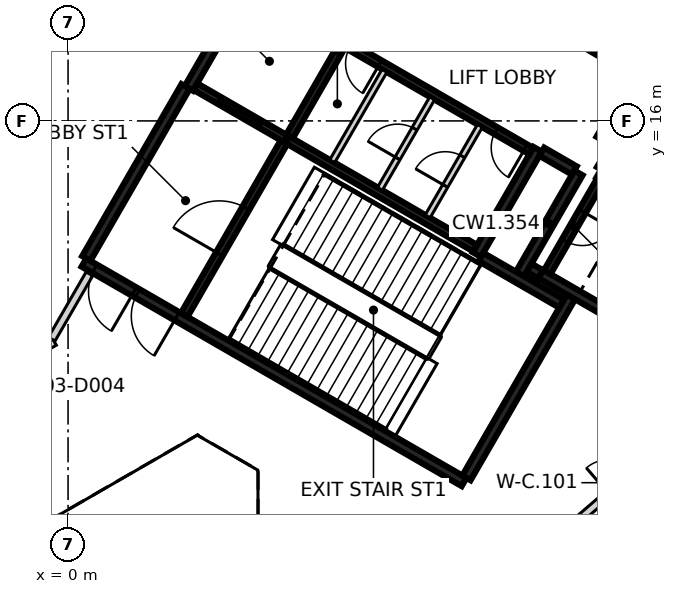
"""IFC4 building model, lengths in metres.
Left out: names, types, materials, properties, quantities, classifications, styles, units other than length and angle.
Written with IfcOpenShell. Run it as: python <this file> out.ifc"""

import sys

from ifc_helpers import new_model, si_unit, direction, frame, frame_2d, origin, place, context, subcontext, project, spatial, rectangle, extrude, element, fill, save


model = new_model("IFC4")
c1 = context("Model", 3, precision=1e-05, world=origin(), true_north=direction((0.0, 1.0)))
c2 = subcontext(c1, "Body", "Model", "MODEL_VIEW")
j1 = project(units=[si_unit("LENGTHUNIT", "METRE"), si_unit("PLANEANGLEUNIT", "RADIAN")], contexts=[c1])
p1 = place(None, origin())
s1 = spatial("IfcSite", under=j1, at=p1, CompositionType="ELEMENT")
p2 = place(p1, origin())
s2 = spatial("IfcBuilding", under=s1, at=p2, CompositionType="ELEMENT")
p3 = place(p2, frame((0.0, 0.0, 19.5)))
s3 = spatial("IfcBuildingStorey", under=s2, at=p3, CompositionType="ELEMENT", Elevation=19.5)
p4 = place(p3, frame((10.42, 6.498, 0.0), z_axis=(0.0, 0.0, 1.0), x_axis=(-0.866021906294, 0.500006057782, 0.0)))
e1 = element("IfcWall", 1, at=p4, inside=s3, PredefinedType="SHEAR", context=c2, shape_type="SweptSolid", body=[
    extrude(rectangle(XDim=11.55, YDim=0.25, at=frame_2d((5.775, 0.0))), origin(), (0.0, 0.0, 1.0), 4.55),
])
p5 = place(p4, frame((10.025, 0.0, 0.0)))
e2 = element("IfcOpeningElement", 2, at=p5, cuts=e1, PredefinedType="OPENING", context=c2, shape_type="SweptSolid", body=[
    extrude(rectangle(XDim=1.2, YDim=2.1, at=frame_2d((0.6, 1.05))), frame((0.0, 0.135, 0.0), z_axis=(0.0, -1.0, 0.0), x_axis=(1.0, 0.0, 0.0)), (0.0, 0.0, 1.0), 0.27),
])
p6 = place(p4, frame((8.725, 0.0, 0.0)))
e3 = element("IfcOpeningElement", 3, at=p6, cuts=e1, PredefinedType="OPENING", context=c2, shape_type="SweptSolid", body=[
    extrude(rectangle(XDim=1.2, YDim=2.1, at=frame_2d((0.6, 1.05))), frame((0.0, 0.135, 0.0), z_axis=(0.0, -1.0, 0.0), x_axis=(1.0, 0.0, 0.0)), (0.0, 0.0, 1.0), 0.27),
])
p7 = place(p3, frame((3.179, 16.856, 0.0), z_axis=(0.0, 0.0, 1.0), x_axis=(0.500004234368, 0.866022959057, 0.0)))
e4 = element("IfcWall", 4, at=p7, inside=s3, PredefinedType="SHEAR", context=c2, shape_type="SweptSolid", body=[
    extrude(rectangle(XDim=6.25, YDim=0.25, at=frame_2d((3.125, 0.0))), origin(), (0.0, 0.0, 1.0), 4.55),
])
p8 = place(p3, frame((0.48, 12.381, 0.0), z_axis=(0.0, 0.0, 1.0), x_axis=(0.49999885962, 0.866026062182, 0.0)))
e5 = element("IfcWall", 5, at=p8, inside=s3, PredefinedType="SHEAR", context=c2, shape_type="SweptSolid", body=[
    extrude(rectangle(XDim=5.225, YDim=0.25, at=frame_2d((2.612, 0.0))), origin(), (0.0, 0.0, 1.0), 4.55),
])
p9 = place(p3, frame((13.238, 11.378, 0.0), z_axis=(0.0, 0.0, 1.0), x_axis=(-0.500008851346, -0.866020293397, 0.0)))
e6 = element("IfcWall", 6, at=p9, inside=s3, PredefinedType="SHEAR", context=c2, shape_type="SweptSolid", body=[
    extrude(rectangle(XDim=5.51, YDim=0.25, at=frame_2d((2.755, 0.0))), origin(), (0.0, 0.0, 1.0), 4.55),
])
p10 = place(p3, frame((12.357, 15.252, 0.0), z_axis=(0.0, 0.0, 1.0), x_axis=(-0.500028443584, -0.866008981251, 0.0)))
e7 = element("IfcWall", 7, at=p10, inside=s3, PredefinedType="SHEAR", context=c2, shape_type="SweptSolid", body=[
    extrude(rectangle(XDim=3.2, YDim=0.25, at=frame_2d((1.6, 0.0))), origin(), (0.0, 0.0, 1.0), 4.55),
])
p11 = place(p3, frame((14.918, 10.54, 0.0), z_axis=(0.0, 0.0, 1.0), x_axis=(-0.866063538972, 0.499933942099, 0.0)))
e8 = element("IfcWall", 8, at=p11, inside=s3, PredefinedType="SHEAR", context=c2, shape_type="SweptSolid", body=[
    extrude(rectangle(XDim=2.865, YDim=0.25, at=frame_2d((1.432, 0.0))), origin(), (0.0, 0.0, 1.0), 4.55),
])
p12 = place(p3, frame((13.963, 14.614, 0.0), z_axis=(0.0, 0.0, 1.0), x_axis=(0.866042235819, -0.499970844928, 0.0)))
e9 = element("IfcWall", 9, at=p12, inside=s3, PredefinedType="SHEAR", context=c2, shape_type="SweptSolid", body=[
    extrude(rectangle(XDim=2.865, YDim=0.25, at=frame_2d((1.432, 0.0))), origin(), (0.0, 0.0, 1.0), 4.55),
])
p13 = place(p3, frame((11.888, 11.961, 0.0), z_axis=(0.0, 0.0, 1.0), x_axis=(0.500003324108, 0.866023484601, 0.0)))
e10 = element("IfcWall", 10, at=p13, inside=s3, PredefinedType="SHEAR", context=c2, shape_type="SweptSolid", body=[
    extrude(rectangle(XDim=3.085, YDim=0.25, at=frame_2d((1.542, 0.0))), origin(), (0.0, 0.0, 1.0), 4.55),
])
p14 = place(p3, frame((10.865, 12.418, 0.0), z_axis=(0.0, 0.0, 1.0), x_axis=(0.866026229868, -0.499998569178, 0.0)))
e11 = element("IfcWall", 11, at=p14, inside=s3, PredefinedType="SHEAR", context=c2, shape_type="SweptSolid", body=[
    extrude(rectangle(XDim=2.449, YDim=0.25, at=frame_2d((1.225, 0.0))), origin(), (0.0, 0.0, 1.0), 4.55),
])
p15 = place(p3, frame((13.297, 18.231, 0.0), z_axis=(0.0, 0.0, 1.0), x_axis=(0.866043531843, -0.499968599967, 0.0)))
e12 = element("IfcWall", 12, at=p15, inside=s3, PredefinedType="SHEAR", context=c2, shape_type="SweptSolid", body=[
    extrude(rectangle(XDim=1.975, YDim=0.25, at=frame_2d((0.987, 0.0))), origin(), (0.0, 0.0, 1.0), 4.55),
])
p16 = place(p3, frame((14.945, 17.135, 0.0), z_axis=(0.0, 0.0, 1.0), x_axis=(-0.499983108224, -0.866035156036, 0.0)))
e13 = element("IfcWall", 13, at=p16, inside=s3, PredefinedType="SHEAR", context=c2, shape_type="SweptSolid", body=[
    extrude(rectangle(XDim=1.865, YDim=0.25, at=frame_2d((0.932, 0.0))), origin(), (0.0, 0.0, 1.0), 4.55),
])
p17 = place(p16, frame((0.535, 0.0, 0.0)))
e14 = element("IfcOpeningElement", 14, at=p17, cuts=e13, PredefinedType="OPENING", context=c2, shape_type="SweptSolid", body=[
    extrude(rectangle(XDim=1.25, YDim=2.1, at=frame_2d((0.625, 1.05))), frame((0.0, 0.135, 0.0), z_axis=(0.0, -1.0, 0.0), x_axis=(1.0, 0.0, 0.0)), (0.0, 0.0, 1.0), 0.27),
])
p18 = place(p3, frame((13.322, 14.695, 0.0), z_axis=(0.0, 0.0, 1.0), x_axis=(-0.866017078145, 0.500014420154, 0.0)))
e15 = element("IfcWall", 15, at=p18, inside=s3, PredefinedType="SHEAR", context=c2, shape_type="SweptSolid", body=[
    extrude(rectangle(XDim=0.989, YDim=0.25, at=frame_2d((0.495, 0.0))), origin(), (0.0, 0.0, 1.0), 4.55),
])
p19 = place(p3, frame((14.368, 15.315, 0.0), z_axis=(0.0, 0.0, 1.0), x_axis=(-0.499897359611, -0.866084655132, 0.0)))
e16 = element("IfcWall", 16, at=p19, inside=s3, PredefinedType="SHEAR", context=c2, shape_type="SweptSolid", body=[
    extrude(rectangle(XDim=0.685, YDim=0.25, at=frame_2d((0.342, 0.0))), origin(), (0.0, 0.0, 1.0), 4.55),
])
p20 = place(p3, frame((12.433, 11.964, 0.0), z_axis=(0.0, 0.0, 1.0), x_axis=(-0.866055875208, 0.499947218231, 0.0)))
e17 = element("IfcWall", 17, at=p20, inside=s3, PredefinedType="SHEAR", context=c2, shape_type="SweptSolid", body=[
    extrude(rectangle(XDim=0.345, YDim=0.25, at=frame_2d((0.172, 0.0))), origin(), (0.0, 0.0, 1.0), 4.55),
])
p21 = place(p3, frame((5.775, 15.502, 0.0), z_axis=(0.0, 0.0, 1.0), x_axis=(0.866020080793, -0.500009219579, 0.0)))
e18 = element("IfcWall", 18, at=p21, inside=s3, PredefinedType="SHEAR", context=c2, shape_type="SweptSolid", body=[
    extrude(rectangle(XDim=5.699, YDim=0.2, at=frame_2d((2.85, 0.0))), origin(), (0.0, 0.0, 1.0), 4.55),
])
p22 = place(p3, frame((12.185, 15.207, 0.0), z_axis=(0.0, 0.0, 1.0), x_axis=(-0.866020080793, 0.500009219579, 0.0)))
e19 = element("IfcWall", 19, at=p22, inside=s3, PredefinedType="SHEAR", context=c2, shape_type="SweptSolid", body=[
    extrude(rectangle(XDim=5.699, YDim=0.2, at=frame_2d((2.85, 0.0))), origin(), (0.0, 0.0, 1.0), 4.55),
])
p23 = place(p22, frame((0.174, 0.0, 0.0)))
e20 = element("IfcOpeningElement", 20, at=p23, cuts=e19, PredefinedType="OPENING", context=c2, shape_type="SweptSolid", body=[
    extrude(rectangle(XDim=0.9, YDim=2.1, at=frame_2d((0.45, 1.05))), frame((0.0, 0.11, 0.0), z_axis=(0.0, -1.0, 0.0), x_axis=(1.0, 0.0, 0.0)), (0.0, 0.0, 1.0), 0.22),
])
p24 = place(p22, frame((4.599, 0.0, 0.0)))
e21 = element("IfcOpeningElement", 21, at=p24, cuts=e19, PredefinedType="OPENING", context=c2, shape_type="SweptSolid", body=[
    extrude(rectangle(XDim=0.9, YDim=2.1, at=frame_2d((0.45, 1.05))), frame((0.0, 0.11, 0.0), z_axis=(0.0, -1.0, 0.0), x_axis=(1.0, 0.0, 0.0)), (0.0, 0.0, 1.0), 0.22),
])
p25 = place(p3, frame((3.057, 10.895, 0.0), z_axis=(0.0, 0.0, 1.0), x_axis=(0.499989418164, 0.866031513124, 0.0)))
e22 = element("IfcWall", 22, at=p25, inside=s3, PredefinedType="SHEAR", context=c2, shape_type="SweptSolid", body=[
    extrude(rectangle(XDim=5.251, YDim=0.2, at=frame_2d((2.625, 0.0))), origin(), (0.0, 0.0, 1.0), 4.55),
])
p26 = place(p25, frame((1.849, 0.0, 0.0)))
e23 = element("IfcOpeningElement", 23, at=p26, cuts=e22, PredefinedType="OPENING", context=c2, shape_type="SweptSolid", body=[
    extrude(rectangle(XDim=1.4, YDim=2.1, at=frame_2d((0.7, 1.05))), frame((0.0, 0.11, 0.0), z_axis=(0.0, -1.0, 0.0), x_axis=(1.0, 0.0, 0.0)), (0.0, 0.0, 1.0), 0.22),
])
p27 = place(p3, frame((14.008, 14.442, 0.0), z_axis=(0.0, 0.0, 1.0), x_axis=(-0.499986818241, -0.866033014143, 0.0)))
e24 = element("IfcWall", 24, at=p27, inside=s3, PredefinedType="SHEAR", context=c2, shape_type="SweptSolid", body=[
    extrude(rectangle(XDim=2.798, YDim=0.2, at=frame_2d((1.399, 0.0))), origin(), (0.0, 0.0, 1.0), 4.55),
])
p28 = place(p27, frame((0.949, 0.0, 0.0)))
e25 = element("IfcOpeningElement", 25, at=p28, cuts=e24, PredefinedType="OPENING", context=c2, shape_type="SweptSolid", body=[
    extrude(rectangle(XDim=0.9, YDim=2.1, at=frame_2d((0.45, 1.05))), frame((0.0, 0.11, 0.0), z_axis=(0.0, -1.0, 0.0), x_axis=(1.0, 0.0, 0.0)), (0.0, 0.0, 1.0), 0.22),
])
p29 = place(p3, frame((7.199, 17.97, 0.0), z_axis=(0.0, 0.0, 1.0), x_axis=(-0.499968400327, -0.866043647095, 0.0)))
e26 = element("IfcWall", 26, at=p29, inside=s3, PredefinedType="SHEAR", context=c2, shape_type="SweptSolid", body=[
    extrude(rectangle(XDim=2.75, YDim=0.2, at=frame_2d((1.375, 0.0))), origin(), (0.0, 0.0, 1.0), 4.55),
])
p30 = place(p3, frame((5.725, 15.531, 0.0), z_axis=(0.0, 0.0, 1.0), x_axis=(-0.866037306777, 0.499979382845, 0.0)))
e27 = element("IfcWall", 27, at=p30, inside=s3, PredefinedType="SHEAR", context=c2, shape_type="SweptSolid", body=[
    extrude(rectangle(XDim=2.742, YDim=0.2, at=frame_2d((1.371, 0.0))), origin(), (0.0, 0.0, 1.0), 4.55),
])
p31 = place(p30, frame((0.743, 0.0, 0.0)))
e28 = element("IfcOpeningElement", 28, at=p31, cuts=e27, PredefinedType="OPENING", context=c2, shape_type="SweptSolid", body=[
    extrude(rectangle(XDim=1.3, YDim=2.1, at=frame_2d((0.65, 1.05))), frame((0.0, 0.11, 0.0), z_axis=(0.0, -1.0, 0.0), x_axis=(1.0, 0.0, 0.0)), (0.0, 0.0, 1.0), 0.22),
])
p32 = place(p3, frame((9.462, 13.489, 0.0), z_axis=(0.0, 0.0, 1.0), x_axis=(0.50002746344, 0.86600954718, 0.0)))
e29 = element("IfcWall", 29, at=p32, inside=s3, PredefinedType="PARTITIONING", context=c2, shape_type="SweptSolid", body=[
    extrude(rectangle(XDim=2.748, YDim=0.15, at=frame_2d((1.374, 0.0))), origin(), (0.0, 0.0, 1.0), 4.55),
])
p33 = place(p32, frame((0.924, 0.0, 0.0)))
e30 = element("IfcOpeningElement", 30, at=p33, cuts=e29, PredefinedType="OPENING", context=c2, shape_type="SweptSolid", body=[
    extrude(rectangle(XDim=0.9, YDim=2.1, at=frame_2d((0.45, 1.05))), frame((0.0, 0.085, 0.0), z_axis=(0.0, -1.0, 0.0), x_axis=(1.0, 0.0, 0.0)), (0.0, 0.0, 1.0), 0.17),
])
p34 = place(p3, frame((8.207, 14.214, 0.0), z_axis=(0.0, 0.0, 1.0), x_axis=(0.499922376475, 0.866070215109, 0.0)))
e31 = element("IfcWall", 31, at=p34, inside=s3, PredefinedType="PARTITIONING", context=c2, shape_type="SweptSolid", body=[
    extrude(rectangle(XDim=2.749, YDim=0.15, at=frame_2d((1.374, 0.0))), origin(), (0.0, 0.0, 1.0), 4.55),
])
p35 = place(p34, frame((0.924, 0.0, 0.0)))
e32 = element("IfcOpeningElement", 32, at=p35, cuts=e31, PredefinedType="OPENING", context=c2, shape_type="SweptSolid", body=[
    extrude(rectangle(XDim=0.9, YDim=2.1, at=frame_2d((0.45, 1.05))), frame((0.0, 0.085, 0.0), z_axis=(0.0, -1.0, 0.0), x_axis=(1.0, 0.0, 0.0)), (0.0, 0.0, 1.0), 0.17),
])
p36 = place(p3, frame((6.951, 14.939, 0.0), z_axis=(0.0, 0.0, 1.0), x_axis=(0.50002746344, 0.86600954718, 0.0)))
e33 = element("IfcWall", 33, at=p36, inside=s3, PredefinedType="PARTITIONING", context=c2, shape_type="SweptSolid", body=[
    extrude(rectangle(XDim=2.748, YDim=0.15, at=frame_2d((1.374, 0.0))), origin(), (0.0, 0.0, 1.0), 4.55),
])
p37 = place(p3, frame((-7.774, 5.903, 0.0), z_axis=(0.0, 0.0, 1.0), x_axis=(0.865984718775, 0.500070461884, 0.0)))
e34 = element("IfcWall", 34, at=p37, inside=s3, PredefinedType="PARTITIONING", context=c2, shape_type="SweptSolid", body=[
    extrude(rectangle(XDim=8.562, YDim=0.2, at=frame_2d((4.281, 0.0))), origin(), (0.0, 0.0, 1.0), 4.55),
])
p38 = place(p37, frame((5.165, 0.0, 0.0)))
e35 = element("IfcOpeningElement", 35, at=p38, cuts=e34, PredefinedType="OPENING", context=c2, shape_type="SweptSolid", body=[
    extrude(rectangle(XDim=2.0, YDim=2.1, at=frame_2d((1.0, 1.05))), frame((0.0, 0.11, 0.0), z_axis=(0.0, -1.0, 0.0), x_axis=(1.0, 0.0, 0.0)), (0.0, 0.0, 1.0), 0.22),
])
p39 = place(p3, frame((-0.43, 10.259, 0.0), z_axis=(0.0, 0.0, 1.0), x_axis=(0.500191429871, 0.865914853484, 0.0)))
e36 = element("IfcWall", 36, at=p39, inside=s3, PredefinedType="PARTITIONING", context=c2, shape_type="SweptSolid", body=[
    extrude(rectangle(XDim=1.983, YDim=0.2, at=frame_2d((0.991, 0.0))), origin(), (0.0, 0.0, 1.0), 4.55),
])
p40 = place(p3, frame((12.187, 4.433, 0.0), z_axis=(0.0, 0.0, 1.0), x_axis=(0.757945584444, 0.652317783769, 0.0)))
e37 = element("IfcWall", 37, at=p40, inside=s3, PredefinedType="PARTITIONING", context=c2, shape_type="SweptSolid", body=[
    extrude(rectangle(XDim=6.278, YDim=0.2, at=frame_2d((3.139, 0.0))), origin(), (0.0, 0.0, 1.0), 4.55),
])
p41 = place(p40, frame((2.689, 0.0, 0.0)))
e38 = element("IfcOpeningElement", 38, at=p41, cuts=e37, PredefinedType="OPENING", context=c2, shape_type="SweptSolid", body=[
    extrude(rectangle(XDim=0.9, YDim=2.1, at=frame_2d((0.45, 1.05))), frame((0.0, 0.11, 0.0), z_axis=(0.0, -1.0, 0.0), x_axis=(1.0, 0.0, 0.0)), (0.0, 0.0, 1.0), 0.22),
])
p42 = place(p3, frame((9.002, 1.913, 0.0), z_axis=(0.0, 0.0, 1.0), x_axis=(0.978140632744, 0.20794446993, 0.0)))
e39 = element("IfcWall", 39, at=p42, inside=s3, PredefinedType="PARTITIONING", context=c2, shape_type="SweptSolid", body=[
    extrude(rectangle(XDim=18.395, YDim=0.2, at=frame_2d((9.198, 0.0))), origin(), (0.0, 0.0, 1.0), 2.15),
])
p43 = place(p31, origin())
e40 = element("IfcDoor", 40, at=p43, inside=s3, OperationType="SLIDING_TO_RIGHT", PredefinedType="DOOR", context=c2, shape_type="SweptSolid", body=[
    extrude(rectangle(XDim=1.3, YDim=2.1, at=frame_2d((0.65, 1.05))), frame((0.0, 0.025, 0.0), z_axis=(0.0, -1.0, 0.0), x_axis=(1.0, 0.0, 0.0)), (0.0, 0.0, 1.0), 0.05),
])
fill(e28, e40)
p44 = place(p5, origin())
e41 = element("IfcDoor", 41, at=p44, inside=s3, OperationType="SINGLE_SWING_LEFT", PredefinedType="DOOR", context=c2, shape_type="SweptSolid", body=[
    extrude(rectangle(XDim=1.2, YDim=2.1, at=frame_2d((0.6, 1.05))), frame((0.0, 0.025, 0.0), z_axis=(0.0, -1.0, 0.0), x_axis=(1.0, 0.0, 0.0)), (0.0, 0.0, 1.0), 0.05),
])
fill(e2, e41)
p45 = place(p6, origin())
e42 = element("IfcDoor", 42, at=p45, inside=s3, OperationType="SINGLE_SWING_RIGHT", PredefinedType="DOOR", context=c2, shape_type="SweptSolid", body=[
    extrude(rectangle(XDim=1.2, YDim=2.1, at=frame_2d((0.6, 1.05))), frame((0.0, 0.025, 0.0), z_axis=(0.0, -1.0, 0.0), x_axis=(1.0, 0.0, 0.0)), (0.0, 0.0, 1.0), 0.05),
])
fill(e3, e42)
p46 = place(p26, origin())
e43 = element("IfcDoor", 43, at=p46, inside=s3, OperationType="SINGLE_SWING_RIGHT", PredefinedType="DOOR", context=c2, shape_type="SweptSolid", body=[
    extrude(rectangle(XDim=1.4, YDim=2.1, at=frame_2d((0.7, 1.05))), frame((0.0, 0.025, 0.0), z_axis=(0.0, -1.0, 0.0), x_axis=(1.0, 0.0, 0.0)), (0.0, 0.0, 1.0), 0.05),
])
fill(e23, e43)
p47 = place(p23, origin())
e44 = element("IfcDoor", 44, at=p47, inside=s3, OperationType="SINGLE_SWING_LEFT", PredefinedType="DOOR", context=c2, shape_type="SweptSolid", body=[
    extrude(rectangle(XDim=0.9, YDim=2.1, at=frame_2d((0.45, 1.05))), frame((0.0, 0.025, 0.0), z_axis=(0.0, -1.0, 0.0), x_axis=(1.0, 0.0, 0.0)), (0.0, 0.0, 1.0), 0.05),
])
fill(e20, e44)
p48 = place(p33, origin())
e45 = element("IfcDoor", 45, at=p48, inside=s3, OperationType="SINGLE_SWING_RIGHT", PredefinedType="DOOR", context=c2, shape_type="SweptSolid", body=[
    extrude(rectangle(XDim=0.9, YDim=2.1, at=frame_2d((0.45, 1.05))), frame((0.0, 0.025, 0.0), z_axis=(0.0, -1.0, 0.0), x_axis=(1.0, 0.0, 0.0)), (0.0, 0.0, 1.0), 0.05),
])
fill(e30, e45)
p49 = place(p35, origin())
e46 = element("IfcDoor", 46, at=p49, inside=s3, OperationType="SINGLE_SWING_LEFT", PredefinedType="DOOR", context=c2, shape_type="SweptSolid", body=[
    extrude(rectangle(XDim=0.9, YDim=2.1, at=frame_2d((0.45, 1.05))), frame((0.0, 0.025, 0.0), z_axis=(0.0, -1.0, 0.0), x_axis=(1.0, 0.0, 0.0)), (0.0, 0.0, 1.0), 0.05),
])
fill(e32, e46)
p50 = place(p24, origin())
e47 = element("IfcDoor", 47, at=p50, inside=s3, OperationType="SINGLE_SWING_RIGHT", PredefinedType="DOOR", context=c2, shape_type="SweptSolid", body=[
    extrude(rectangle(XDim=0.9, YDim=2.1, at=frame_2d((0.45, 1.05))), frame((0.0, 0.025, 0.0), z_axis=(0.0, -1.0, 0.0), x_axis=(1.0, 0.0, 0.0)), (0.0, 0.0, 1.0), 0.05),
])
fill(e21, e47)
p51 = place(p28, origin())
e48 = element("IfcDoor", 48, at=p51, inside=s3, OperationType="SINGLE_SWING_LEFT", PredefinedType="DOOR", context=c2, shape_type="SweptSolid", body=[
    extrude(rectangle(XDim=0.9, YDim=2.1, at=frame_2d((0.45, 1.05))), frame((0.0, 0.025, 0.0), z_axis=(0.0, -1.0, 0.0), x_axis=(1.0, 0.0, 0.0)), (0.0, 0.0, 1.0), 0.05),
])
fill(e25, e48)
save(model, sys.argv[1])
